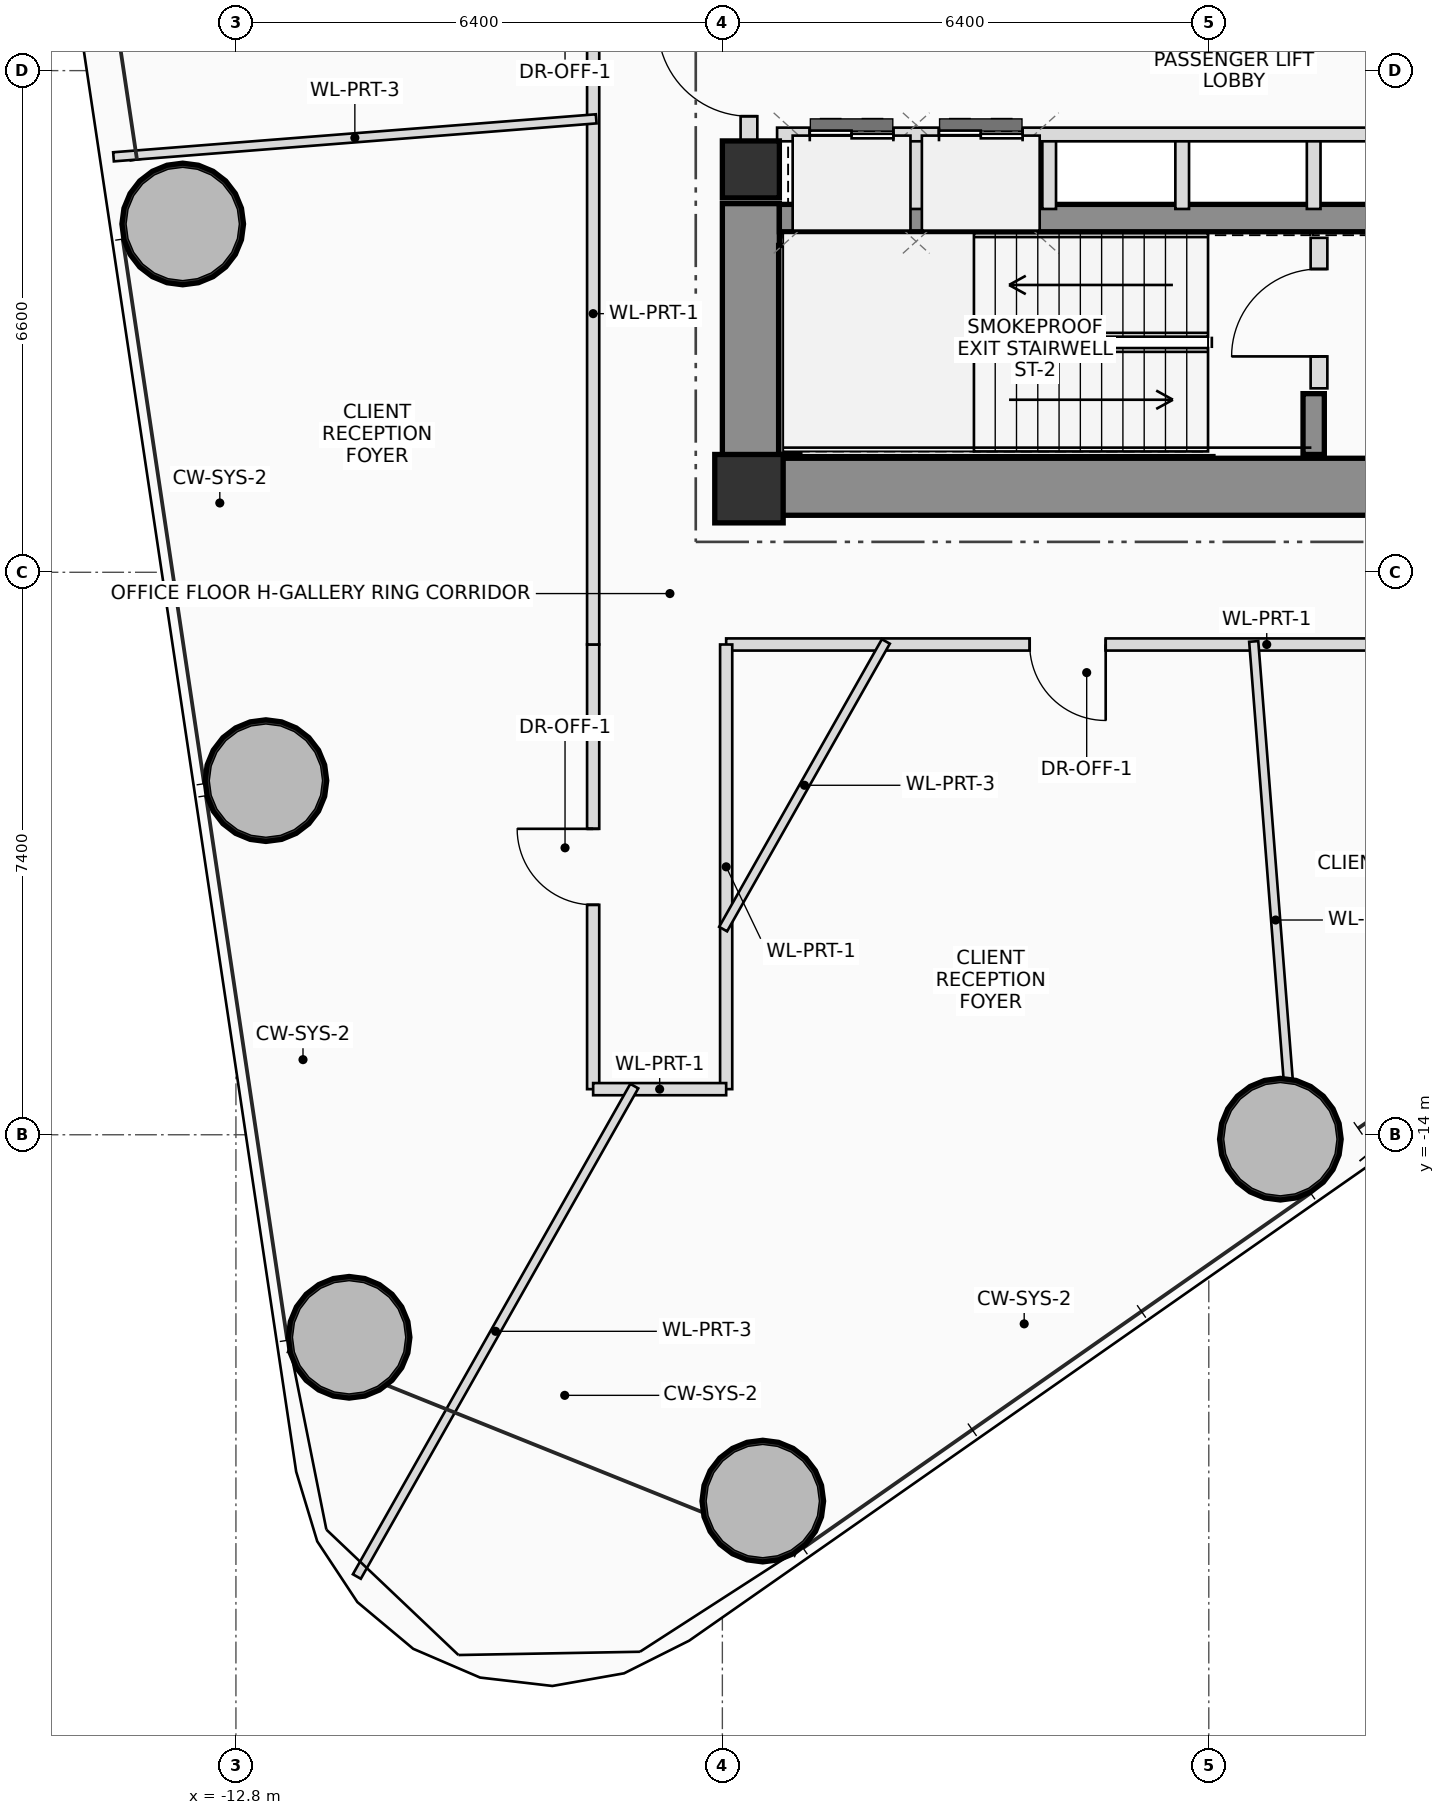
"""IFC4 building model, lengths in metres.
Left out: names, types, materials, properties, quantities, classifications, styles, units other than length and angle.
Written with IfcOpenShell. Run it as: python <this file> out.ifc"""

import sys

from ifc_helpers import new_model, si_unit, direction, frame, frame_2d, origin, origin_2d, place, context, subcontext, project, spatial, rectangle, hollow_circle, extrude, source, transform, mapped, element, fill, save


model = new_model("IFC4")
c1 = context("Model", 3, precision=1e-05, world=origin(), true_north=direction((0.0, 1.0)))
c2 = subcontext(c1, "Body", "Model", "MODEL_VIEW")
j1 = project(units=[si_unit("LENGTHUNIT", "METRE"), si_unit("PLANEANGLEUNIT", "RADIAN")], contexts=[c1])
p1 = place(None, origin())
s1 = spatial("IfcSite", under=j1, at=p1, CompositionType="ELEMENT")
p2 = place(p1, origin())
s2 = spatial("IfcBuilding", under=s1, at=p2, CompositionType="ELEMENT")
p3 = place(p2, frame((0.0, 0.0, 73.55)))
s3 = spatial("IfcBuildingStorey", under=s2, at=p3, CompositionType="ELEMENT", Elevation=73.55)
m1 = source(origin(), c2, "Body", "SweptSolid", [
    extrude(rectangle(XDim=0.9, YDim=0.9, at=origin_2d()), origin(), (0.0, 0.0, 1.0), 3.75),
])
p4 = place(p3, frame((-6.05, -5.5, 0.0), z_axis=(0.0, 0.0, 1.0), x_axis=(1.0, 0.0, 0.0)))
e1 = element("IfcColumn", 1, at=p4, inside=s3, PredefinedType="COLUMN", context=c2, shape_type="MappedRepresentation", body=[
    mapped(m1, transform((0.0, 0.0, 0.0), scale=1.0)),
])
p5 = place(p3, frame((-6.4, -5.475, 0.0), z_axis=(0.0, 0.0, 1.0), x_axis=(1.0, 0.0, 0.0)))
e2 = element("IfcWall", 2, at=p5, inside=s3, PredefinedType="SHEAR", context=c2, shape_type="SweptSolid", body=[
    extrude(rectangle(XDim=12.8, YDim=0.75, at=frame_2d((6.4, 0.0))), origin(), (0.0, 0.0, 1.0), 3.75),
])
p6 = place(p5, frame((8.6, 0.0, 0.0)))
e3 = element("IfcOpeningElement", 3, at=p6, cuts=e2, PredefinedType="OPENING", context=c2, shape_type="SweptSolid", body=[
    extrude(rectangle(XDim=1.2, YDim=2.2, at=frame_2d((0.6, 1.1))), frame((0.0, 0.385, 0.0), z_axis=(0.0, -1.0, 0.0), x_axis=(1.0, 0.0, 0.0)), (0.0, 0.0, 1.0), 0.77),
])
p7 = place(p3, frame((-6.025, -5.1, 0.0), z_axis=(0.0, 0.0, 1.0), x_axis=(0.0, 1.0, 0.0)))
e4 = element("IfcWall", 4, at=p7, inside=s3, PredefinedType="SHEAR", context=c2, shape_type="SweptSolid", body=[
    extrude(rectangle(XDim=3.35, YDim=0.75, at=frame_2d((1.675, 0.0))), origin(), (0.0, 0.0, 1.0), 3.75),
])
p8 = place(p3, frame((-5.65, -1.94, 0.0), z_axis=(0.0, 0.0, 1.0), x_axis=(1.0, 0.0, 0.0)))
e5 = element("IfcWall", 5, at=p8, inside=s3, PredefinedType="SHEAR", context=c2, shape_type="SweptSolid", body=[
    extrude(rectangle(XDim=11.3, YDim=0.36, at=frame_2d((5.65, 0.0))), origin(), (0.0, 0.0, 1.0), 3.75),
])
p9 = place(p3, frame((-5.52, -5.05, 0.0), z_axis=(0.0, 0.0, 1.0), x_axis=(0.0, 1.0, 0.0)))
e6 = element("IfcWall", 6, at=p9, inside=s3, PredefinedType="SHEAR", context=c2, shape_type="SweptSolid", body=[
    extrude(rectangle(XDim=2.75, YDim=0.28, at=frame_2d((1.375, 0.0))), origin(), (0.0, 0.0, 1.0), 3.75),
])
p10 = place(p3, frame((1.38, -5.05, 0.0), z_axis=(0.0, 0.0, 1.0), x_axis=(0.0, 1.0, 0.0)))
e7 = element("IfcWall", 7, at=p10, inside=s3, PredefinedType="SHEAR", context=c2, shape_type="SweptSolid", body=[
    extrude(rectangle(XDim=0.8, YDim=0.28, at=frame_2d((0.4, 0.0))), origin(), (0.0, 0.0, 1.0), 3.75),
])
m2 = source(origin(), c2, "Body", "SweptSolid", [
    extrude(rectangle(XDim=0.75, YDim=0.75, at=origin_2d()), origin(), (0.0, 0.0, 1.0), 3.75),
])
p11 = place(p3, frame((-6.025, -1.3, 0.0), z_axis=(0.0, 0.0, 1.0), x_axis=(1.0, 0.0, 0.0)))
e8 = element("IfcColumn", 8, at=p11, inside=s3, PredefinedType="COLUMN", context=c2, shape_type="MappedRepresentation", body=[
    mapped(m2, transform((0.0, 0.0, 0.0), scale=1.0)),
])
m3 = source(origin(), c2, "Body", "SweptSolid", [
    extrude(hollow_circle(Radius=0.8, WallThickness=0.055, at=origin_2d()), origin(), (0.0, 0.0, 1.0), 3.75),
])
for number, where, z_axis, x_axis in (
    (9, (-5.868, -18.819, 0.0), (0.0, 0.0, 1.0), (1.0, 0.0, 0.0)),
    (10, (0.942, -14.058, 0.0), (0.0, 0.0, 1.0), (1.0, 0.0, 0.0)),
    (11, (-13.5, -2.018, 0.0), (0.0, 0.0, 1.0), (1.0, 0.0, 0.0)),
    (12, (-12.406, -9.341, 0.0), (0.0, 0.0, 1.0), (1.0, 0.0, 0.0)),
    (13, (-11.311, -16.665, 0.0), (0.0, 0.0, 1.0), (1.0, 0.0, 0.0)),
):
    element("IfcColumn", number, at=place(p3, frame(where, z_axis=z_axis, x_axis=x_axis)), inside=s3, PredefinedType="COLUMN", context=c2, shape_type="MappedRepresentation", body=[
        mapped(m3, transform((0.0, 0.0, 0.0), scale=1.0)),
    ])
p12 = place(p3, frame((-6.05, -0.95, 0.0), z_axis=(0.0, 0.0, 1.0), x_axis=(0.0, 1.0, 0.0)))
e14 = element("IfcWall", 14, at=p12, inside=s3, PredefinedType="PLUMBINGWALL", context=c2, shape_type="SweptSolid", body=[
    extrude(rectangle(XDim=1.9, YDim=0.22, at=frame_2d((0.95, 0.0))), origin(), (0.0, 0.0, 1.0), 2.525),
])
p13 = place(p12, frame((0.35, 0.0, 0.0)))
e15 = element("IfcOpeningElement", 15, at=p13, cuts=e14, PredefinedType="OPENING", context=c2, shape_type="SweptSolid", body=[
    extrude(rectangle(XDim=1.2, YDim=2.2, at=frame_2d((0.6, 1.1))), frame((0.0, 0.12, 0.0), z_axis=(0.0, -1.0, 0.0), x_axis=(1.0, 0.0, 0.0)), (0.0, 0.0, 1.0), 0.24),
])
p14 = place(p3, frame((1.45, -4.18, 0.0), z_axis=(0.0, 0.0, 1.0), x_axis=(0.0, 1.0, 0.0)))
e16 = element("IfcWall", 16, at=p14, inside=s3, PredefinedType="PLUMBINGWALL", context=c2, shape_type="SweptSolid", body=[
    extrude(rectangle(XDim=1.98, YDim=0.22, at=frame_2d((0.99, 0.0))), origin(), (0.0, 0.0, 1.0), 3.545),
])
p15 = place(p14, frame((0.42, 0.0, 0.0)))
e17 = element("IfcOpeningElement", 17, at=p15, cuts=e16, PredefinedType="OPENING", context=c2, shape_type="SweptSolid", body=[
    extrude(rectangle(XDim=1.15, YDim=2.15, at=frame_2d((0.575, 1.075))), frame((0.0, 0.12, 0.0), z_axis=(0.0, -1.0, 0.0), x_axis=(1.0, 0.0, 0.0)), (0.0, 0.0, 1.0), 0.24),
])
for number, where, z_axis, x_axis in (
    (18, (-3.85, -1.82, 0.0), (0.0, 0.0, 1.0), (0.0, 1.0, 0.0)),
    (19, (-2.1, -1.82, 0.0), (0.0, 0.0, 1.0), (0.0, 1.0, 0.0)),
    (20, (-0.35, -1.82, 0.0), (0.0, 0.0, 1.0), (0.0, 1.0, 0.0)),
    (21, (1.38, -1.82, 0.0), (0.0, 0.0, 1.0), (0.0, 1.0, 0.0)),
):
    element("IfcWall", number, at=place(p3, frame(where, z_axis=z_axis, x_axis=x_axis)), inside=s3, PredefinedType="PLUMBINGWALL", context=c2, shape_type="SweptSolid", body=[
        extrude(rectangle(XDim=0.98, YDim=0.18, at=frame_2d((0.49, 0.0))), origin(), (0.0, 0.0, 1.0), 3.545),
    ])
p16 = place(p3, frame((-5.68, -0.84, 0.0), z_axis=(0.0, 0.0, 1.0), x_axis=(1.0, 0.0, 0.0)))
e22 = element("IfcWall", 22, at=p16, inside=s3, PredefinedType="PLUMBINGWALL", context=c2, shape_type="SweptSolid", body=[
    extrude(rectangle(XDim=10.22, YDim=0.18, at=frame_2d((5.11, 0.0))), origin(), (0.0, 0.0, 1.0), 3.545),
])
p17 = place(p16, frame((0.43, 0.0, 0.0)))
e23 = element("IfcOpeningElement", 23, at=p17, cuts=e22, PredefinedType="OPENING", context=c2, shape_type="SweptSolid", body=[
    extrude(rectangle(XDim=1.1, YDim=2.2, at=frame_2d((0.55, 1.1))), frame((0.0, 0.1, 0.0), z_axis=(0.0, -1.0, 0.0), x_axis=(1.0, 0.0, 0.0)), (0.0, 0.0, 1.0), 0.2),
])
p18 = place(p16, frame((2.13, 0.0, 0.0)))
e24 = element("IfcOpeningElement", 24, at=p18, cuts=e22, PredefinedType="OPENING", context=c2, shape_type="SweptSolid", body=[
    extrude(rectangle(XDim=1.1, YDim=2.2, at=frame_2d((0.55, 1.1))), frame((0.0, 0.1, 0.0), z_axis=(0.0, -1.0, 0.0), x_axis=(1.0, 0.0, 0.0)), (0.0, 0.0, 1.0), 0.2),
])
p19 = place(p16, frame((9.02, 0.0, 0.0)))
e25 = element("IfcOpeningElement", 25, at=p19, cuts=e22, PredefinedType="OPENING", context=c2, shape_type="SweptSolid", body=[
    extrude(rectangle(XDim=0.9, YDim=2.05, at=frame_2d((0.45, 1.025))), frame((0.0, 0.1, 0.0), z_axis=(0.0, -1.0, 0.0), x_axis=(1.0, 0.0, 0.0)), (0.0, 0.0, 1.0), 0.2),
])
p20 = place(p3, frame((-8.1, -13.4, 0.0), z_axis=(0.0, 0.0, 1.0), x_axis=(0.0, 1.0, 0.0)))
e26 = element("IfcWall", 26, at=p20, inside=s3, PredefinedType="PARTITIONING", context=c2, shape_type="SweptSolid", body=[
    extrude(rectangle(XDim=5.85, YDim=0.16, at=frame_2d((2.925, 0.0))), origin(), (0.0, 0.0, 1.0), 2.85),
])
p21 = place(p20, frame((2.425, 0.0, 0.0)))
e27 = element("IfcOpeningElement", 27, at=p21, cuts=e26, PredefinedType="OPENING", context=c2, shape_type="SweptSolid", body=[
    extrude(rectangle(XDim=1.0, YDim=2.25, at=frame_2d((0.5, 1.125))), frame((0.0, 0.09, 0.0), z_axis=(0.0, -1.0, 0.0), x_axis=(1.0, 0.0, 0.0)), (0.0, 0.0, 1.0), 0.18),
])
p22 = place(p3, frame((-8.1, -7.55, 0.0), z_axis=(0.0, 0.0, 1.0), x_axis=(0.0, 1.0, 0.0)))
e28 = element("IfcWall", 28, at=p22, inside=s3, PredefinedType="PARTITIONING", context=c2, shape_type="SweptSolid", body=[
    extrude(rectangle(XDim=15.1, YDim=0.16, at=frame_2d((7.55, 0.0))), origin(), (0.0, 0.0, 1.0), 2.85),
])
p23 = place(p22, frame((8.855, 0.0, 0.0)))
e29 = element("IfcOpeningElement", 29, at=p23, cuts=e28, PredefinedType="OPENING", context=c2, shape_type="SweptSolid", body=[
    extrude(rectangle(XDim=1.0, YDim=2.25, at=frame_2d((0.5, 1.125))), frame((0.0, 0.09, 0.0), z_axis=(0.0, -1.0, 0.0), x_axis=(1.0, 0.0, 0.0)), (0.0, 0.0, 1.0), 0.18),
])
p24 = place(p22, frame((12.865, 0.0, 0.0)))
e30 = element("IfcOpeningElement", 30, at=p24, cuts=e28, PredefinedType="OPENING", context=c2, shape_type="SweptSolid", body=[
    extrude(rectangle(XDim=1.0, YDim=2.25, at=frame_2d((0.5, 1.125))), frame((0.0, 0.09, 0.0), z_axis=(0.0, -1.0, 0.0), x_axis=(1.0, 0.0, 0.0)), (0.0, 0.0, 1.0), 0.18),
])
p25 = place(p3, frame((6.35, -7.55, 0.0), z_axis=(0.0, 0.0, 1.0), x_axis=(-1.0, 0.0, 0.0)))
e31 = element("IfcWall", 31, at=p25, inside=s3, PredefinedType="PARTITIONING", context=c2, shape_type="SweptSolid", body=[
    extrude(rectangle(XDim=12.7, YDim=0.16, at=frame_2d((6.35, 0.0))), origin(), (0.0, 0.0, 1.0), 2.85),
])
p26 = place(p25, frame((2.469, 0.0, 0.0)))
e32 = element("IfcOpeningElement", 32, at=p26, cuts=e31, PredefinedType="OPENING", context=c2, shape_type="SweptSolid", body=[
    extrude(rectangle(XDim=1.0, YDim=2.25, at=frame_2d((0.5, 1.125))), frame((0.0, 0.09, 0.0), z_axis=(0.0, -1.0, 0.0), x_axis=(1.0, 0.0, 0.0)), (0.0, 0.0, 1.0), 0.18),
])
p27 = place(p25, frame((7.707, 0.0, 0.0)))
e33 = element("IfcOpeningElement", 33, at=p27, cuts=e31, PredefinedType="OPENING", context=c2, shape_type="SweptSolid", body=[
    extrude(rectangle(XDim=1.0, YDim=2.25, at=frame_2d((0.5, 1.125))), frame((0.0, 0.09, 0.0), z_axis=(0.0, -1.0, 0.0), x_axis=(1.0, 0.0, 0.0)), (0.0, 0.0, 1.0), 0.18),
])
p28 = place(p3, frame((-6.35, -7.55, 0.0), z_axis=(0.0, 0.0, 1.0), x_axis=(0.0, -1.0, 0.0)))
e34 = element("IfcWall", 34, at=p28, inside=s3, PredefinedType="PARTITIONING", context=c2, shape_type="SweptSolid", body=[
    extrude(rectangle(XDim=5.85, YDim=0.16, at=frame_2d((2.925, 0.0))), origin(), (0.0, 0.0, 1.0), 3.05),
])
p29 = place(p3, frame((-6.35, -13.4, 0.0), z_axis=(0.0, 0.0, 1.0), x_axis=(-1.0, 0.0, 0.0)))
e35 = element("IfcWall", 35, at=p29, inside=s3, PredefinedType="PARTITIONING", context=c2, shape_type="SweptSolid", body=[
    extrude(rectangle(XDim=1.75, YDim=0.16, at=frame_2d((0.875, 0.0))), origin(), (0.0, 0.0, 1.0), 3.545),
])
p30 = place(p3, frame((-8.06, -0.634, 0.0), z_axis=(0.0, 0.0, 1.0), x_axis=(-0.996917899667, -0.078451904529, 0.0)))
e36 = element("IfcWall", 36, at=p30, inside=s3, PredefinedType="PARTITIONING", context=c2, shape_type="SweptSolid", body=[
    extrude(rectangle(XDim=6.37, YDim=0.12, at=frame_2d((3.185, 0.0))), origin(), (0.0, 0.0, 1.0), 3.01),
])
p31 = place(p3, frame((-4.249, -7.51, 0.0), z_axis=(0.0, 0.0, 1.0), x_axis=(-0.492403224766, -0.870367200807, 0.0)))
e37 = element("IfcWall", 37, at=p31, inside=s3, PredefinedType="PARTITIONING", context=c2, shape_type="SweptSolid", body=[
    extrude(rectangle(XDim=4.348, YDim=0.12, at=frame_2d((2.174, 0.0))), origin(), (0.0, 0.0, 1.0), 2.85),
])
p32 = place(p3, frame((-7.559, -13.36, 0.0), z_axis=(0.0, 0.0, 1.0), x_axis=(-0.492445728691, -0.870343153184, 0.0)))
e38 = element("IfcWall", 38, at=p32, inside=s3, PredefinedType="PARTITIONING", context=c2, shape_type="SweptSolid", body=[
    extrude(rectangle(XDim=7.413, YDim=0.12, at=frame_2d((3.707, 0.0))), origin(), (0.0, 0.0, 1.0), 3.01),
])
p33 = place(p3, frame((0.591, -7.51, 0.0), z_axis=(0.0, 0.0, 1.0), x_axis=(0.078466268921, -0.996916769165, 0.0)))
e39 = element("IfcWall", 39, at=p33, inside=s3, PredefinedType="PARTITIONING", context=c2, shape_type="SweptSolid", body=[
    extrude(rectangle(XDim=7.352, YDim=0.12, at=frame_2d((3.676, 0.0))), origin(), (0.0, 0.0, 1.0), 3.05),
])
p34 = place(p13, origin())
e40 = element("IfcDoor", 40, at=p34, inside=s3, OperationType="SINGLE_SWING_RIGHT", PredefinedType="DOOR", context=c2, shape_type="SweptSolid", body=[
    extrude(rectangle(XDim=1.2, YDim=2.2, at=frame_2d((0.6, 1.1))), frame((0.0, 0.025, 0.0), z_axis=(0.0, -1.0, 0.0), x_axis=(1.0, 0.0, 0.0)), (0.0, 0.0, 1.0), 0.05),
])
fill(e15, e40)
p35 = place(p15, origin())
e41 = element("IfcDoor", 41, at=p35, inside=s3, OperationType="SINGLE_SWING_LEFT", PredefinedType="DOOR", context=c2, shape_type="SweptSolid", body=[
    extrude(rectangle(XDim=1.15, YDim=2.15, at=frame_2d((0.575, 1.075))), frame((0.0, 0.025, 0.0), z_axis=(0.0, -1.0, 0.0), x_axis=(1.0, 0.0, 0.0)), (0.0, 0.0, 1.0), 0.05),
])
fill(e17, e41)
p36 = place(p17, origin())
e42 = element("IfcDoor", 42, at=p36, inside=s3, OperationType="DOUBLE_DOOR_SLIDING", PredefinedType="DOOR", context=c2, shape_type="SweptSolid", body=[
    extrude(rectangle(XDim=1.1, YDim=2.2, at=frame_2d((0.55, 1.1))), frame((0.0, 0.025, 0.0), z_axis=(0.0, -1.0, 0.0), x_axis=(1.0, 0.0, 0.0)), (0.0, 0.0, 1.0), 0.05),
])
fill(e23, e42)
p37 = place(p18, origin())
e43 = element("IfcDoor", 43, at=p37, inside=s3, OperationType="DOUBLE_DOOR_SLIDING", PredefinedType="DOOR", context=c2, shape_type="SweptSolid", body=[
    extrude(rectangle(XDim=1.1, YDim=2.2, at=frame_2d((0.55, 1.1))), frame((0.0, 0.025, 0.0), z_axis=(0.0, -1.0, 0.0), x_axis=(1.0, 0.0, 0.0)), (0.0, 0.0, 1.0), 0.05),
])
fill(e24, e43)
p38 = place(p21, origin())
e44 = element("IfcDoor", 44, at=p38, inside=s3, OperationType="SINGLE_SWING_RIGHT", PredefinedType="DOOR", context=c2, shape_type="SweptSolid", body=[
    extrude(rectangle(XDim=1.0, YDim=2.25, at=frame_2d((0.5, 1.125))), frame((0.0, 0.025, 0.0), z_axis=(0.0, -1.0, 0.0), x_axis=(1.0, 0.0, 0.0)), (0.0, 0.0, 1.0), 0.05),
])
fill(e27, e44)
p39 = place(p27, origin())
e45 = element("IfcDoor", 45, at=p39, inside=s3, OperationType="SINGLE_SWING_LEFT", PredefinedType="DOOR", context=c2, shape_type="SweptSolid", body=[
    extrude(rectangle(XDim=1.0, YDim=2.25, at=frame_2d((0.5, 1.125))), frame((0.0, 0.025, 0.0), z_axis=(0.0, -1.0, 0.0), x_axis=(1.0, 0.0, 0.0)), (0.0, 0.0, 1.0), 0.05),
])
fill(e33, e45)
save(model, sys.argv[1])
